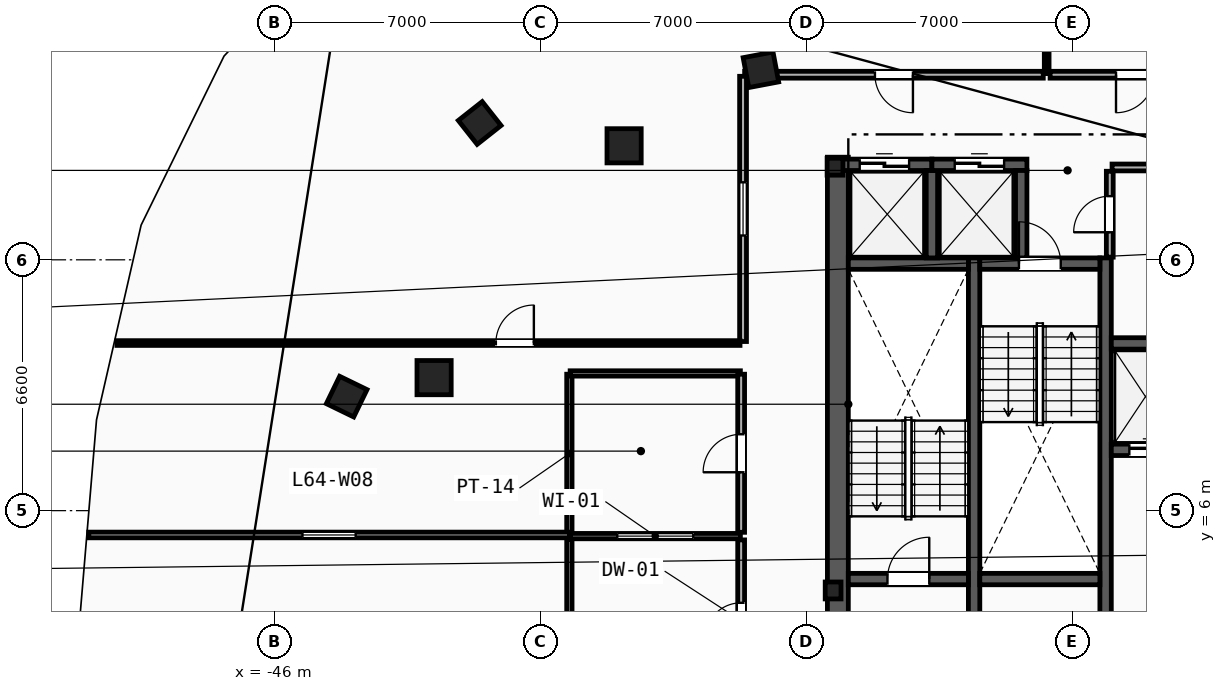
"""IFC4 building model, lengths in metres.
Left out: names, types, materials, properties, quantities, classifications, styles, units other than length and angle.
Written with IfcOpenShell. Run it as: python <this file> out.ifc"""

import sys

from ifc_helpers import new_model, si_unit, direction, frame, frame_2d, origin, origin_2d, place, context, subcontext, project, spatial, rectangle, i_section, extrude, element, fill, save


model = new_model("IFC4")
c1 = context("Model", 3, precision=1e-05, world=origin(), true_north=direction((0.0, 1.0)))
c2 = subcontext(c1, "Body", "Model", "MODEL_VIEW")
j1 = project(units=[si_unit("LENGTHUNIT", "METRE"), si_unit("PLANEANGLEUNIT", "RADIAN")], contexts=[c1])
p1 = place(None, origin())
s1 = spatial("IfcSite", under=j1, at=p1, CompositionType="ELEMENT")
p2 = place(p1, origin())
s2 = spatial("IfcBuilding", under=s1, at=p2, CompositionType="ELEMENT")
p3 = place(p2, frame((0.0, 0.0, 243.2)))
s3 = spatial("IfcBuildingStorey", under=s2, at=p3, CompositionType="ELEMENT", Elevation=243.2)
for number, where, z_axis, x_axis in (
    (1, (-31.3, 3.9, 0.0), (0.0, 0.0, 1.0), (1.0, 0.0, 0.0)),
    (2, (-31.25, 15.05, 0.0), (0.0, 0.0, 1.0), (1.0, 0.0, 0.0)),
):
    element("IfcColumn", number, at=place(p3, frame(where, z_axis=z_axis, x_axis=x_axis)), inside=s3, PredefinedType="COLUMN", context=c2, shape_type="SweptSolid", body=[
        extrude(i_section(OverallWidth=0.416, OverallDepth=0.446, WebThickness=0.039, FlangeThickness=0.063, FilletRadius=0.018, at=origin_2d()), origin(), (0.0, 0.0, 1.0), 3.6),
    ])
for number, where, z_axis, x_axis in (
    (3, (-41.8, 9.5, 0.0), (0.0, 0.0, 1.0), (1.0, 0.0, 0.0)),
    (4, (-36.8, 15.6, 0.0), (0.0, 0.0, 1.0), (1.0, 0.0, 0.0)),
):
    element("IfcColumn", number, at=place(p3, frame(where, z_axis=z_axis, x_axis=x_axis)), inside=s3, PredefinedType="COLUMN", context=c2, shape_type="SweptSolid", body=[
        extrude(rectangle(XDim=0.9, YDim=0.9, at=origin_2d()), origin(), (0.0, 0.0, 1.0), 3.6),
    ])
for number, where, z_axis, x_axis in (
    (5, (-33.2, 17.6, 0.0), (0.0, 0.0, 1.0), (-0.983, -0.186, 0.0)),
    (6, (-40.6, 16.2, 0.0), (0.0, 0.0, 1.0), (-0.785, -0.619, 0.0)),
    (7, (-44.1, 9.0, 0.0), (0.0, 0.0, 1.0), (-0.437, -0.899, 0.0)),
):
    element("IfcColumn", number, at=place(p3, frame(where, z_axis=z_axis, x_axis=x_axis)), inside=s3, PredefinedType="COLUMN", context=c2, shape_type="SweptSolid", body=[
        extrude(rectangle(XDim=0.8, YDim=0.8, at=origin_2d()), origin(), (0.0, 0.0, 1.0), 3.6),
    ])
p4 = place(p3, frame((-31.175, 1.97, 0.0), z_axis=(0.0, 0.0, 1.0), x_axis=(0.0, 1.0, 0.0)))
e8 = element("IfcWall", 8, at=p4, inside=s3, PredefinedType="SHEAR", context=c2, shape_type="SweptSolid", body=[
    extrude(rectangle(XDim=13.33, YDim=0.55, at=frame_2d((6.665, 0.0))), origin(), (0.0, 0.0, 1.0), 3.34),
])
for number, where, z_axis, x_axis in (
    (9, (-27.59, 1.97, 0.0), (0.0, 0.0, 1.0), (0.0, 1.0, 0.0)),
    (10, (-24.13, 1.97, 0.0), (0.0, 0.0, 1.0), (0.0, 1.0, 0.0)),
):
    element("IfcWall", number, at=place(p3, frame(where, z_axis=z_axis, x_axis=x_axis)), inside=s3, PredefinedType="SHEAR", context=c2, shape_type="SweptSolid", body=[
        extrude(rectangle(XDim=10.68, YDim=0.3, at=frame_2d((5.34, 0.0))), origin(), (0.0, 0.0, 1.0), 3.34),
    ])
p5 = place(p3, frame((-30.9, 4.2, 0.0), z_axis=(0.0, 0.0, 1.0), x_axis=(1.0, 0.0, 0.0)))
e11 = element("IfcWall", 11, at=p5, inside=s3, PredefinedType="SHEAR", context=c2, shape_type="SweptSolid", body=[
    extrude(rectangle(XDim=3.16, YDim=0.3, at=frame_2d((1.58, 0.0))), origin(), (0.0, 0.0, 1.0), 3.34),
])
p6 = place(p5, frame((1.03, 0.0, 0.0)))
e12 = element("IfcOpeningElement", 12, at=p6, cuts=e11, PredefinedType="OPENING", context=c2, shape_type="SweptSolid", body=[
    extrude(rectangle(XDim=1.1, YDim=2.15, at=frame_2d((0.55, 1.075))), frame((0.0, 0.16, 0.0), z_axis=(0.0, -1.0, 0.0), x_axis=(1.0, 0.0, 0.0)), (0.0, 0.0, 1.0), 0.32),
])
p7 = place(p3, frame((-30.9, 12.5, 0.0), z_axis=(0.0, 0.0, 1.0), x_axis=(1.0, 0.0, 0.0)))
e13 = element("IfcWall", 13, at=p7, inside=s3, PredefinedType="SHEAR", context=c2, shape_type="SweptSolid", body=[
    extrude(rectangle(XDim=3.16, YDim=0.3, at=frame_2d((1.58, 0.0))), origin(), (0.0, 0.0, 1.0), 3.34),
])
p8 = place(p3, frame((-27.44, 12.5, 0.0), z_axis=(0.0, 0.0, 1.0), x_axis=(1.0, 0.0, 0.0)))
e14 = element("IfcWall", 14, at=p8, inside=s3, PredefinedType="SHEAR", context=c2, shape_type="SweptSolid", body=[
    extrude(rectangle(XDim=3.16, YDim=0.3, at=frame_2d((1.58, 0.0))), origin(), (0.0, 0.0, 1.0), 3.34),
])
p9 = place(p8, frame((1.03, 0.0, 0.0)))
e15 = element("IfcOpeningElement", 15, at=p9, cuts=e14, PredefinedType="OPENING", context=c2, shape_type="SweptSolid", body=[
    extrude(rectangle(XDim=1.1, YDim=2.15, at=frame_2d((0.55, 1.075))), frame((0.0, 0.16, 0.0), z_axis=(0.0, -1.0, 0.0), x_axis=(1.0, 0.0, 0.0)), (0.0, 0.0, 1.0), 0.32),
])
p10 = place(p3, frame((-27.44, 4.2, 0.0), z_axis=(0.0, 0.0, 1.0), x_axis=(1.0, 0.0, 0.0)))
e16 = element("IfcWall", 16, at=p10, inside=s3, PredefinedType="SHEAR", context=c2, shape_type="SweptSolid", body=[
    extrude(rectangle(XDim=3.16, YDim=0.3, at=frame_2d((1.58, 0.0))), origin(), (0.0, 0.0, 1.0), 3.34),
])
p11 = place(p3, frame((-23.98, 7.6, 0.0), z_axis=(0.0, 0.0, 1.0), x_axis=(1.0, 0.0, 0.0)))
e17 = element("IfcWall", 17, at=p11, inside=s3, PredefinedType="SHEAR", context=c2, shape_type="SweptSolid", body=[
    extrude(rectangle(XDim=2.1, YDim=0.3, at=frame_2d((1.05, 0.0))), origin(), (0.0, 0.0, 1.0), 3.34),
])
p12 = place(p11, frame((0.475, 0.0, 0.0)))
e18 = element("IfcOpeningElement", 18, at=p12, cuts=e17, PredefinedType="OPENING", context=c2, shape_type="SweptSolid", body=[
    extrude(rectangle(XDim=1.15, YDim=2.2, at=frame_2d((0.575, 1.1))), frame((0.0, 0.16, 0.0), z_axis=(0.0, -1.0, 0.0), x_axis=(1.0, 0.0, 0.0)), (0.0, 0.0, 1.0), 0.32),
])
p13 = place(p3, frame((-23.98, 10.4, 0.0), z_axis=(0.0, 0.0, 1.0), x_axis=(1.0, 0.0, 0.0)))
e19 = element("IfcWall", 19, at=p13, inside=s3, PredefinedType="SHEAR", context=c2, shape_type="SweptSolid", body=[
    extrude(rectangle(XDim=2.1, YDim=0.3, at=frame_2d((1.05, 0.0))), origin(), (0.0, 0.0, 1.0), 3.34),
])
p14 = place(p3, frame((-31.2, 15.1, 0.0), z_axis=(0.0, 0.0, 1.0), x_axis=(1.0, 0.0, 0.0)))
e20 = element("IfcWall", 20, at=p14, inside=s3, PredefinedType="SHEAR", context=c2, shape_type="SweptSolid", body=[
    extrude(rectangle(XDim=2.5, YDim=0.3, at=frame_2d((1.25, 0.0))), origin(), (0.0, 0.0, 1.0), 3.34),
])
p15 = place(p14, frame((0.6, 0.0, 0.0)))
e21 = element("IfcOpeningElement", 21, at=p15, cuts=e20, PredefinedType="OPENING", context=c2, shape_type="SweptSolid", body=[
    extrude(rectangle(XDim=1.3, YDim=2.2, at=frame_2d((0.65, 1.1))), frame((0.0, 0.16, 0.0), z_axis=(0.0, -1.0, 0.0), x_axis=(1.0, 0.0, 0.0)), (0.0, 0.0, 1.0), 0.32),
])
p16 = place(p3, frame((-28.7, 12.65, 0.0), z_axis=(0.0, 0.0, 1.0), x_axis=(0.0, 1.0, 0.0)))
e22 = element("IfcWall", 22, at=p16, inside=s3, PredefinedType="SHEAR", context=c2, shape_type="SweptSolid", body=[
    extrude(rectangle(XDim=2.3, YDim=0.3, at=frame_2d((1.15, 0.0))), origin(), (0.0, 0.0, 1.0), 3.34),
])
p17 = place(p3, frame((-28.7, 15.1, 0.0), z_axis=(0.0, 0.0, 1.0), x_axis=(1.0, 0.0, 0.0)))
e23 = element("IfcWall", 23, at=p17, inside=s3, PredefinedType="SHEAR", context=c2, shape_type="SweptSolid", body=[
    extrude(rectangle(XDim=2.5, YDim=0.3, at=frame_2d((1.25, 0.0))), origin(), (0.0, 0.0, 1.0), 3.34),
])
p18 = place(p17, frame((0.6, 0.0, 0.0)))
e24 = element("IfcOpeningElement", 24, at=p18, cuts=e23, PredefinedType="OPENING", context=c2, shape_type="SweptSolid", body=[
    extrude(rectangle(XDim=1.3, YDim=2.2, at=frame_2d((0.65, 1.1))), frame((0.0, 0.16, 0.0), z_axis=(0.0, -1.0, 0.0), x_axis=(1.0, 0.0, 0.0)), (0.0, 0.0, 1.0), 0.32),
])
p19 = place(p3, frame((-26.35, 12.65, 0.0), z_axis=(0.0, 0.0, 1.0), x_axis=(0.0, 1.0, 0.0)))
e25 = element("IfcWall", 25, at=p19, inside=s3, PredefinedType="SHEAR", context=c2, shape_type="SweptSolid", body=[
    extrude(rectangle(XDim=2.3, YDim=0.3, at=frame_2d((1.15, 0.0))), origin(), (0.0, 0.0, 1.0), 3.34),
])
p20 = place(p3, frame((-23.96, 15.03, 0.0), z_axis=(0.0, 0.0, 1.0), x_axis=(1.0, 0.0, 0.0)))
e26 = element("IfcWall", 26, at=p20, inside=s3, PredefinedType="PARTITIONING", context=c2, shape_type="SweptSolid", body=[
    extrude(rectangle(XDim=2.61, YDim=0.18, at=frame_2d((1.305, 0.0))), origin(), (0.0, 0.0, 1.0), 2.413),
])
p21 = place(p3, frame((-24.02, 12.67, 0.0), z_axis=(0.0, 0.0, 1.0), x_axis=(0.0, 1.0, 0.0)))
e27 = element("IfcWall", 27, at=p21, inside=s3, PredefinedType="PARTITIONING", context=c2, shape_type="SweptSolid", body=[
    extrude(rectangle(XDim=2.26, YDim=0.18, at=frame_2d((1.13, 0.0))), origin(), (0.0, 0.0, 1.0), 3.34),
])
p22 = place(p21, frame((0.655, 0.0, 0.0)))
e28 = element("IfcOpeningElement", 28, at=p22, cuts=e27, PredefinedType="OPENING", context=c2, shape_type="SweptSolid", body=[
    extrude(rectangle(XDim=0.95, YDim=2.1, at=frame_2d((0.475, 1.05))), frame((0.0, 0.1, 0.0), z_axis=(0.0, -1.0, 0.0), x_axis=(1.0, 0.0, 0.0)), (0.0, 0.0, 1.0), 0.2),
])
p23 = place(p3, frame((-38.24, 0.97, 0.0), z_axis=(0.0, 0.0, 1.0), x_axis=(0.0, 1.0, 0.0)))
e29 = element("IfcWall", 29, at=p23, inside=s3, PredefinedType="PARTITIONING", context=c2, shape_type="SweptSolid", body=[
    extrude(rectangle(XDim=4.275, YDim=0.14, at=frame_2d((2.138, 0.0))), origin(), (0.0, 0.0, 1.0), 3.34),
])
p24 = place(p3, frame((-38.24, 5.415, 0.0), z_axis=(0.0, 0.0, 1.0), x_axis=(0.0, 1.0, 0.0)))
e30 = element("IfcWall", 30, at=p24, inside=s3, PredefinedType="PARTITIONING", context=c2, shape_type="SweptSolid", body=[
    extrude(rectangle(XDim=4.175, YDim=0.14, at=frame_2d((2.087, 0.0))), origin(), (0.0, 0.0, 1.0), 3.34),
])
p25 = place(p3, frame((-38.22, 5.33, 0.0), z_axis=(0.0, 0.0, 1.0), x_axis=(1.0, 0.0, 0.0)))
e31 = element("IfcWall", 31, at=p25, inside=s3, PredefinedType="PARTITIONING", context=c2, shape_type="SweptSolid", body=[
    extrude(rectangle(XDim=4.48, YDim=0.14, at=frame_2d((2.24, 0.0))), origin(), (0.0, 0.0, 1.0), 3.34),
])
p26 = place(p25, frame((1.24, 0.0, 1.05)))
e32 = element("IfcOpeningElement", 32, at=p26, cuts=e31, PredefinedType="OPENING", context=c2, shape_type="SweptSolid", body=[
    extrude(rectangle(XDim=2.0, YDim=1.5, at=frame_2d((1.0, 0.75))), frame((0.0, 0.08, 0.0), z_axis=(0.0, -1.0, 0.0), x_axis=(1.0, 0.0, 0.0)), (0.0, 0.0, 1.0), 0.16),
])
p27 = place(p3, frame((-38.22, 9.61, 0.0), z_axis=(0.0, 0.0, 1.0), x_axis=(1.0, 0.0, 0.0)))
e33 = element("IfcWall", 33, at=p27, inside=s3, PredefinedType="PARTITIONING", context=c2, shape_type="SweptSolid", body=[
    extrude(rectangle(XDim=4.48, YDim=0.14, at=frame_2d((2.24, 0.0))), origin(), (0.0, 0.0, 1.0), 3.34),
])
p28 = place(p3, frame((-33.72, 0.97, 0.0), z_axis=(0.0, 0.0, 1.0), x_axis=(0.0, 1.0, 0.0)))
e34 = element("IfcWall", 34, at=p28, inside=s3, PredefinedType="PARTITIONING", context=c2, shape_type="SweptSolid", body=[
    extrude(rectangle(XDim=4.26, YDim=0.18, at=frame_2d((2.13, 0.0))), origin(), (0.0, 0.0, 1.0), 3.34),
])
p29 = place(p28, frame((1.655, 0.0, 0.0)))
e35 = element("IfcOpeningElement", 35, at=p29, cuts=e34, PredefinedType="OPENING", context=c2, shape_type="SweptSolid", body=[
    extrude(rectangle(XDim=0.95, YDim=2.1, at=frame_2d((0.475, 1.05))), frame((0.0, 0.1, 0.0), z_axis=(0.0, -1.0, 0.0), x_axis=(1.0, 0.0, 0.0)), (0.0, 0.0, 1.0), 0.2),
])
p30 = place(p3, frame((-33.72, 5.43, 0.0), z_axis=(0.0, 0.0, 1.0), x_axis=(0.0, 1.0, 0.0)))
e36 = element("IfcWall", 36, at=p30, inside=s3, PredefinedType="PARTITIONING", context=c2, shape_type="SweptSolid", body=[
    extrude(rectangle(XDim=4.16, YDim=0.18, at=frame_2d((2.08, 0.0))), origin(), (0.0, 0.0, 1.0), 3.34),
])
p31 = place(p30, frame((1.58, 0.0, 0.0)))
e37 = element("IfcOpeningElement", 37, at=p31, cuts=e36, PredefinedType="OPENING", context=c2, shape_type="SweptSolid", body=[
    extrude(rectangle(XDim=1.0, YDim=2.15, at=frame_2d((0.5, 1.075))), frame((0.0, 0.1, 0.0), z_axis=(0.0, -1.0, 0.0), x_axis=(1.0, 0.0, 0.0)), (0.0, 0.0, 1.0), 0.2),
])
p32 = place(p3, frame((-50.887, 5.36, 0.0), z_axis=(0.0, 0.0, 1.0), x_axis=(1.0, 0.0, 0.0)))
e38 = element("IfcWall", 38, at=p32, inside=s3, PredefinedType="PARTITIONING", context=c2, shape_type="SweptSolid", body=[
    extrude(rectangle(XDim=12.648, YDim=0.15, at=frame_2d((6.324, 0.0))), origin(), (0.0, 0.0, 1.0), 3.34),
])
p33 = place(p32, frame((5.624, 0.0, 1.05)))
e39 = element("IfcOpeningElement", 39, at=p33, cuts=e38, PredefinedType="OPENING", context=c2, shape_type="SweptSolid", body=[
    extrude(rectangle(XDim=1.4, YDim=1.5, at=frame_2d((0.7, 0.75))), frame((0.0, 0.085, 0.0), z_axis=(0.0, -1.0, 0.0), x_axis=(1.0, 0.0, 0.0)), (0.0, 0.0, 1.0), 0.17),
])
p34 = place(p3, frame((-25.68, 17.5, 0.0), z_axis=(0.0, 0.0, 1.0), x_axis=(0.0, 1.0, 0.0)))
e40 = element("IfcWall", 40, at=p34, inside=s3, PredefinedType="PARTITIONING", context=c2, shape_type="SweptSolid", body=[
    extrude(rectangle(XDim=6.76, YDim=0.125, at=frame_2d((3.38, 0.0))), origin(), (0.0, 0.0, 1.0), 3.34),
])
p35 = place(p34, frame((2.38, 0.0, 1.05)))
e41 = element("IfcOpeningElement", 41, at=p35, cuts=e40, PredefinedType="OPENING", context=c2, shape_type="SweptSolid", body=[
    extrude(rectangle(XDim=2.0, YDim=1.5, at=frame_2d((1.0, 0.75))), frame((0.0, 0.073, 0.0), z_axis=(0.0, -1.0, 0.0), x_axis=(1.0, 0.0, 0.0)), (0.0, 0.0, 1.0), 0.145),
])
p36 = place(p3, frame((-21.122, 17.47, 0.0), z_axis=(0.0, 0.0, 1.0), x_axis=(-1.0, 0.0, 0.0)))
e42 = element("IfcWall", 42, at=p36, inside=s3, PredefinedType="PARTITIONING", context=c2, shape_type="SweptSolid", body=[
    extrude(rectangle(XDim=4.469, YDim=0.18, at=frame_2d((2.234, 0.0))), origin(), (0.0, 0.0, 1.0), 3.34),
])
p37 = place(p36, frame((1.734, 0.0, 0.0)))
e43 = element("IfcOpeningElement", 43, at=p37, cuts=e42, PredefinedType="OPENING", context=c2, shape_type="SweptSolid", body=[
    extrude(rectangle(XDim=1.0, YDim=2.15, at=frame_2d((0.5, 1.075))), frame((0.0, 0.1, 0.0), z_axis=(0.0, -1.0, 0.0), x_axis=(1.0, 0.0, 0.0)), (0.0, 0.0, 1.0), 0.2),
])
p38 = place(p3, frame((-25.77, 17.47, 0.0), z_axis=(0.0, 0.0, 1.0), x_axis=(-1.0, 0.0, 0.0)))
e44 = element("IfcWall", 44, at=p38, inside=s3, PredefinedType="PARTITIONING", context=c2, shape_type="SweptSolid", body=[
    extrude(rectangle(XDim=7.858, YDim=0.18, at=frame_2d((3.929, 0.0))), origin(), (0.0, 0.0, 1.0), 3.34),
])
p39 = place(p38, frame((3.429, 0.0, 0.0)))
e45 = element("IfcOpeningElement", 45, at=p39, cuts=e44, PredefinedType="OPENING", context=c2, shape_type="SweptSolid", body=[
    extrude(rectangle(XDim=1.0, YDim=2.15, at=frame_2d((0.5, 1.075))), frame((0.0, 0.1, 0.0), z_axis=(0.0, -1.0, 0.0), x_axis=(1.0, 0.0, 0.0)), (0.0, 0.0, 1.0), 0.2),
])
p40 = place(p3, frame((-33.67, 17.428, 0.0), z_axis=(0.0, 0.0, 1.0), x_axis=(0.0, -1.0, 0.0)))
e46 = element("IfcWall", 46, at=p40, inside=s3, PredefinedType="PARTITIONING", context=c2, shape_type="SweptSolid", body=[
    extrude(rectangle(XDim=6.979, YDim=0.18, at=frame_2d((3.489, 0.0))), origin(), (0.0, 0.0, 1.0), 3.34),
])
p41 = place(p40, frame((2.789, 0.0, 1.05)))
e47 = element("IfcOpeningElement", 47, at=p41, cuts=e46, PredefinedType="OPENING", context=c2, shape_type="SweptSolid", body=[
    extrude(rectangle(XDim=1.4, YDim=1.5, at=frame_2d((0.7, 0.75))), frame((0.0, 0.1, 0.0), z_axis=(0.0, -1.0, 0.0), x_axis=(1.0, 0.0, 0.0)), (0.0, 0.0, 1.0), 0.2),
])
p42 = place(p3, frame((-50.146, 10.41, 0.0), z_axis=(0.0, 0.0, 1.0), x_axis=(1.0, 0.0, 0.0)))
e48 = element("IfcWall", 48, at=p42, inside=s3, PredefinedType="PARTITIONING", context=c2, shape_type="SweptSolid", body=[
    extrude(rectangle(XDim=16.396, YDim=0.125, at=frame_2d((8.198, 0.0))), origin(), (0.0, 0.0, 1.0), 3.34),
])
p43 = place(p42, frame((9.971, 0.0, 0.0)))
e49 = element("IfcOpeningElement", 49, at=p43, cuts=e48, PredefinedType="OPENING", context=c2, shape_type="SweptSolid", body=[
    extrude(rectangle(XDim=1.0, YDim=2.15, at=frame_2d((0.5, 1.075))), frame((0.0, 0.073, 0.0), z_axis=(0.0, -1.0, 0.0), x_axis=(1.0, 0.0, 0.0)), (0.0, 0.0, 1.0), 0.145),
])
p44 = place(p6, origin())
e50 = element("IfcDoor", 50, at=p44, inside=s3, OperationType="SINGLE_SWING_RIGHT", PredefinedType="DOOR", context=c2, shape_type="SweptSolid", body=[
    extrude(rectangle(XDim=1.1, YDim=2.15, at=frame_2d((0.55, 1.075))), frame((0.0, 0.025, 0.0), z_axis=(0.0, -1.0, 0.0), x_axis=(1.0, 0.0, 0.0)), (0.0, 0.0, 1.0), 0.05),
])
fill(e12, e50)
p45 = place(p9, origin())
e51 = element("IfcDoor", 51, at=p45, inside=s3, OperationType="SINGLE_SWING_LEFT", PredefinedType="DOOR", context=c2, shape_type="SweptSolid", body=[
    extrude(rectangle(XDim=1.1, YDim=2.15, at=frame_2d((0.55, 1.075))), frame((0.0, 0.025, 0.0), z_axis=(0.0, -1.0, 0.0), x_axis=(1.0, 0.0, 0.0)), (0.0, 0.0, 1.0), 0.05),
])
fill(e15, e51)
p46 = place(p12, origin())
e52 = element("IfcDoor", 52, at=p46, inside=s3, OperationType="SLIDING_TO_LEFT", PredefinedType="TRAPDOOR", context=c2, shape_type="SweptSolid", body=[
    extrude(rectangle(XDim=1.15, YDim=2.2, at=frame_2d((0.575, 1.1))), frame((0.0, 0.025, 0.0), z_axis=(0.0, -1.0, 0.0), x_axis=(1.0, 0.0, 0.0)), (0.0, 0.0, 1.0), 0.05),
])
fill(e18, e52)
p47 = place(p15, origin())
e53 = element("IfcDoor", 53, at=p47, inside=s3, OperationType="SLIDING_TO_LEFT", PredefinedType="TRAPDOOR", context=c2, shape_type="SweptSolid", body=[
    extrude(rectangle(XDim=1.3, YDim=2.2, at=frame_2d((0.65, 1.1))), frame((0.0, 0.025, 0.0), z_axis=(0.0, -1.0, 0.0), x_axis=(1.0, 0.0, 0.0)), (0.0, 0.0, 1.0), 0.05),
])
fill(e21, e53)
p48 = place(p18, origin())
e54 = element("IfcDoor", 54, at=p48, inside=s3, OperationType="SLIDING_TO_LEFT", PredefinedType="TRAPDOOR", context=c2, shape_type="SweptSolid", body=[
    extrude(rectangle(XDim=1.3, YDim=2.2, at=frame_2d((0.65, 1.1))), frame((0.0, 0.025, 0.0), z_axis=(0.0, -1.0, 0.0), x_axis=(1.0, 0.0, 0.0)), (0.0, 0.0, 1.0), 0.05),
])
fill(e24, e54)
p49 = place(p43, origin())
e55 = element("IfcDoor", 55, at=p49, inside=s3, OperationType="SINGLE_SWING_RIGHT", PredefinedType="DOOR", context=c2, shape_type="SweptSolid", body=[
    extrude(rectangle(XDim=1.0, YDim=2.15, at=frame_2d((0.5, 1.075))), frame((0.0, 0.025, 0.0), z_axis=(0.0, -1.0, 0.0), x_axis=(1.0, 0.0, 0.0)), (0.0, 0.0, 1.0), 0.05),
])
fill(e49, e55)
p50 = place(p39, origin())
e56 = element("IfcDoor", 56, at=p50, inside=s3, OperationType="SINGLE_SWING_LEFT", PredefinedType="DOOR", context=c2, shape_type="SweptSolid", body=[
    extrude(rectangle(XDim=1.0, YDim=2.15, at=frame_2d((0.5, 1.075))), frame((0.0, 0.025, 0.0), z_axis=(0.0, -1.0, 0.0), x_axis=(1.0, 0.0, 0.0)), (0.0, 0.0, 1.0), 0.05),
])
fill(e45, e56)
p51 = place(p37, origin())
e57 = element("IfcDoor", 57, at=p51, inside=s3, OperationType="SINGLE_SWING_RIGHT", PredefinedType="DOOR", context=c2, shape_type="SweptSolid", body=[
    extrude(rectangle(XDim=1.0, YDim=2.15, at=frame_2d((0.5, 1.075))), frame((0.0, 0.025, 0.0), z_axis=(0.0, -1.0, 0.0), x_axis=(1.0, 0.0, 0.0)), (0.0, 0.0, 1.0), 0.05),
])
fill(e43, e57)
p52 = place(p29, origin())
e58 = element("IfcDoor", 58, at=p52, inside=s3, OperationType="SINGLE_SWING_LEFT", PredefinedType="DOOR", context=c2, shape_type="SweptSolid", body=[
    extrude(rectangle(XDim=0.95, YDim=2.1, at=frame_2d((0.475, 1.05))), frame((0.0, 0.025, 0.0), z_axis=(0.0, -1.0, 0.0), x_axis=(1.0, 0.0, 0.0)), (0.0, 0.0, 1.0), 0.05),
])
fill(e35, e58)
p53 = place(p31, origin())
e59 = element("IfcDoor", 59, at=p53, inside=s3, OperationType="SINGLE_SWING_LEFT", PredefinedType="DOOR", context=c2, shape_type="SweptSolid", body=[
    extrude(rectangle(XDim=1.0, YDim=2.15, at=frame_2d((0.5, 1.075))), frame((0.0, 0.025, 0.0), z_axis=(0.0, -1.0, 0.0), x_axis=(1.0, 0.0, 0.0)), (0.0, 0.0, 1.0), 0.05),
])
fill(e37, e59)
p54 = place(p22, origin())
e60 = element("IfcDoor", 60, at=p54, inside=s3, OperationType="SINGLE_SWING_LEFT", PredefinedType="DOOR", context=c2, shape_type="SweptSolid", body=[
    extrude(rectangle(XDim=0.95, YDim=2.1, at=frame_2d((0.475, 1.05))), frame((0.0, 0.025, 0.0), z_axis=(0.0, -1.0, 0.0), x_axis=(1.0, 0.0, 0.0)), (0.0, 0.0, 1.0), 0.05),
])
fill(e28, e60)
p55 = place(p26, origin())
e61 = element("IfcWindow", 61, at=p55, inside=s3, PartitioningType="SINGLE_PANEL", PredefinedType="WINDOW", context=c2, shape_type="SweptSolid", body=[
    extrude(rectangle(XDim=2.0, YDim=1.5, at=frame_2d((1.0, 0.75))), frame((0.0, 0.03, 0.0), z_axis=(0.0, -1.0, 0.0), x_axis=(1.0, 0.0, 0.0)), (0.0, 0.0, 1.0), 0.06),
])
fill(e32, e61)
p56 = place(p33, origin())
e62 = element("IfcWindow", 62, at=p56, inside=s3, PartitioningType="SINGLE_PANEL", PredefinedType="WINDOW", context=c2, shape_type="SweptSolid", body=[
    extrude(rectangle(XDim=1.4, YDim=1.5, at=frame_2d((0.7, 0.75))), frame((0.0, 0.03, 0.0), z_axis=(0.0, -1.0, 0.0), x_axis=(1.0, 0.0, 0.0)), (0.0, 0.0, 1.0), 0.06),
])
fill(e39, e62)
p57 = place(p41, origin())
e63 = element("IfcWindow", 63, at=p57, inside=s3, PartitioningType="SINGLE_PANEL", PredefinedType="WINDOW", context=c2, shape_type="SweptSolid", body=[
    extrude(rectangle(XDim=1.4, YDim=1.5, at=frame_2d((0.7, 0.75))), frame((0.0, 0.03, 0.0), z_axis=(0.0, -1.0, 0.0), x_axis=(1.0, 0.0, 0.0)), (0.0, 0.0, 1.0), 0.06),
])
fill(e47, e63)
save(model, sys.argv[1])
